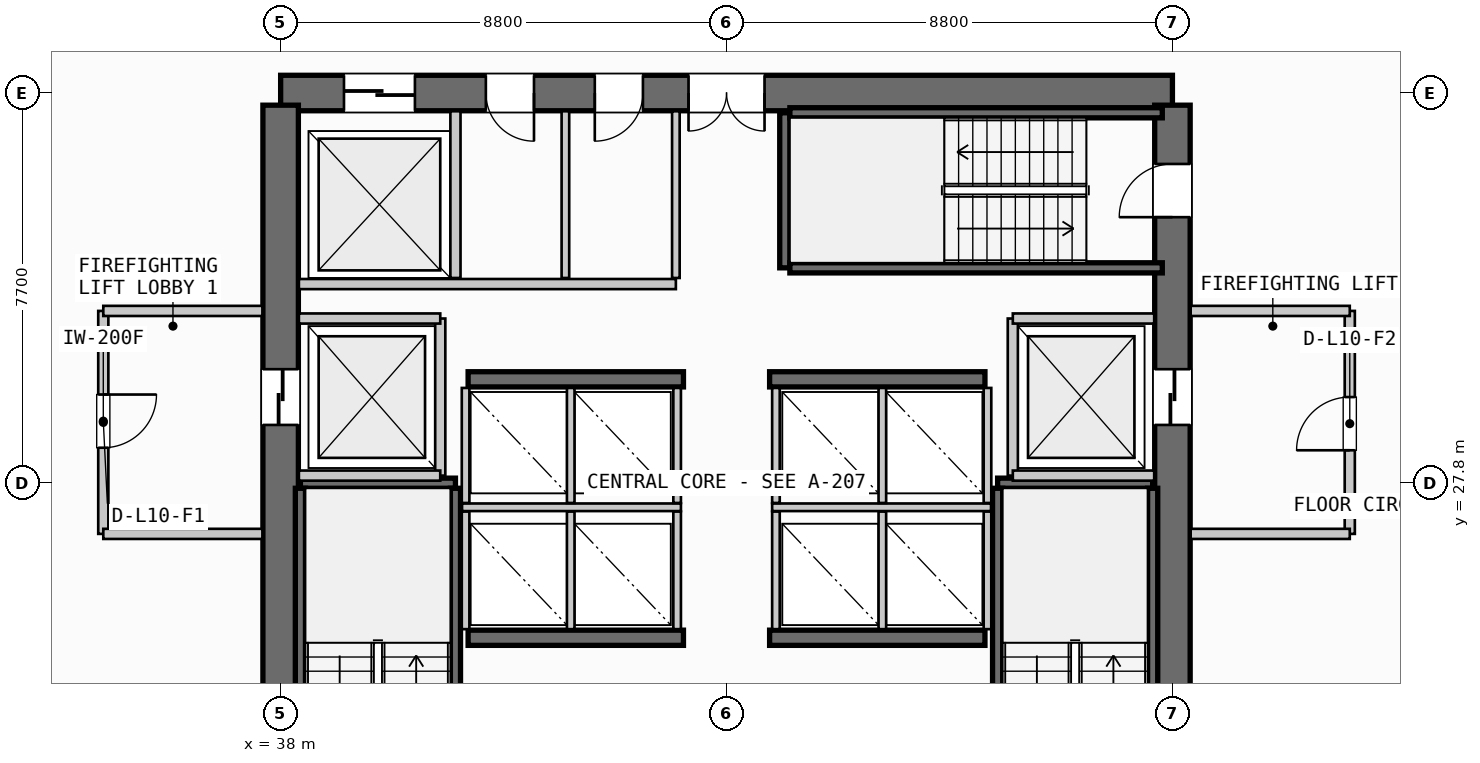
"""IFC4 building model, lengths in metres.
Left out: names, types, materials, properties, quantities, classifications, styles, units other than length and angle.
Written with IfcOpenShell. Run it as: python <this file> out.ifc"""

import sys

from ifc_helpers import new_model, si_unit, direction, frame, frame_2d, origin, place, context, subcontext, project, spatial, rectangle, extrude, source, transform, mapped, element, fill, save


model = new_model("IFC4")
c1 = context("Model", 3, precision=1e-05, world=origin(), true_north=direction((0.0, 1.0)))
c2 = subcontext(c1, "Body", "Model", "MODEL_VIEW")
j1 = project(units=[si_unit("LENGTHUNIT", "METRE"), si_unit("PLANEANGLEUNIT", "RADIAN")], contexts=[c1])
p1 = place(None, origin())
s1 = spatial("IfcSite", under=j1, at=p1, CompositionType="ELEMENT")
p2 = place(p1, origin())
s2 = spatial("IfcBuilding", under=s1, at=p2, CompositionType="ELEMENT")
p3 = place(p2, frame((0.0, 0.0, 44.8)))
s3 = spatial("IfcBuildingStorey", under=s2, at=p3, CompositionType="ELEMENT", Elevation=44.8)
p4 = place(p3, frame((55.6, 35.5, 0.0), z_axis=(0.0, 0.0, 1.0), x_axis=(-1.0, 0.0, 0.0)))
e1 = element("IfcWall", 1, at=p4, inside=s3, PredefinedType="SHEAR", context=c2, shape_type="SweptSolid", body=[
    extrude(rectangle(XDim=17.6, YDim=0.7, at=frame_2d((8.8, 0.0))), origin(), (0.0, 0.0, 1.0), 3.55),
])
p5 = place(p4, frame((8.05, 0.0, 0.0)))
e2 = element("IfcOpeningElement", 2, at=p5, cuts=e1, PredefinedType="OPENING", context=c2, shape_type="SweptSolid", body=[
    extrude(rectangle(XDim=1.5, YDim=2.2, at=frame_2d((0.75, 1.1))), frame((0.0, 0.36, 0.0), z_axis=(0.0, -1.0, 0.0), x_axis=(1.0, 0.0, 0.0)), (0.0, 0.0, 1.0), 0.72),
])
p6 = place(p4, frame((14.95, 0.0, 0.0)))
e3 = element("IfcOpeningElement", 3, at=p6, cuts=e1, PredefinedType="OPENING", context=c2, shape_type="SweptSolid", body=[
    extrude(rectangle(XDim=1.4, YDim=2.3, at=frame_2d((0.7, 1.15))), frame((0.0, 0.36, 0.0), z_axis=(0.0, -1.0, 0.0), x_axis=(1.0, 0.0, 0.0)), (0.0, 0.0, 1.0), 0.72),
])
p7 = place(p4, frame((12.6, 0.0, 0.0)))
e4 = element("IfcOpeningElement", 4, at=p7, cuts=e1, PredefinedType="OPENING", context=c2, shape_type="SweptSolid", body=[
    extrude(rectangle(XDim=0.95, YDim=2.15, at=frame_2d((0.475, 1.075))), frame((0.0, 0.36, 0.0), z_axis=(0.0, -1.0, 0.0), x_axis=(1.0, 0.0, 0.0)), (0.0, 0.0, 1.0), 0.72),
])
p8 = place(p4, frame((10.45, 0.0, 0.0)))
e5 = element("IfcOpeningElement", 5, at=p8, cuts=e1, PredefinedType="OPENING", context=c2, shape_type="SweptSolid", body=[
    extrude(rectangle(XDim=0.95, YDim=2.15, at=frame_2d((0.475, 1.075))), frame((0.0, 0.36, 0.0), z_axis=(0.0, -1.0, 0.0), x_axis=(1.0, 0.0, 0.0)), (0.0, 0.0, 1.0), 0.72),
])
p9 = place(p3, frame((38.0, 35.26, 0.0), z_axis=(0.0, 0.0, 1.0), x_axis=(0.0, -1.0, 0.0)))
e6 = element("IfcWall", 6, at=p9, inside=s3, PredefinedType="SHEAR", context=c2, shape_type="SweptSolid", body=[
    extrude(rectangle(XDim=14.92, YDim=0.7, at=frame_2d((7.46, 0.0))), origin(), (0.0, 0.0, 1.0), 3.55),
])
p10 = place(p9, frame((5.21, 0.0, 0.0)))
e7 = element("IfcOpeningElement", 7, at=p10, cuts=e6, PredefinedType="OPENING", context=c2, shape_type="SweptSolid", body=[
    extrude(rectangle(XDim=1.1, YDim=2.2, at=frame_2d((0.55, 1.1))), frame((0.0, 0.36, 0.0), z_axis=(0.0, -1.0, 0.0), x_axis=(1.0, 0.0, 0.0)), (0.0, 0.0, 1.0), 0.72),
])
p11 = place(p3, frame((55.6, 20.34, 0.0), z_axis=(0.0, 0.0, 1.0), x_axis=(0.0, 1.0, 0.0)))
e8 = element("IfcWall", 8, at=p11, inside=s3, PredefinedType="SHEAR", context=c2, shape_type="SweptSolid", body=[
    extrude(rectangle(XDim=14.92, YDim=0.7, at=frame_2d((7.46, 0.0))), origin(), (0.0, 0.0, 1.0), 3.55),
])
p12 = place(p11, frame((12.71, 0.0, 0.0)))
e9 = element("IfcOpeningElement", 9, at=p12, cuts=e8, PredefinedType="OPENING", context=c2, shape_type="SweptSolid", body=[
    extrude(rectangle(XDim=1.05, YDim=2.15, at=frame_2d((0.525, 1.075))), frame((0.0, 0.36, 0.0), z_axis=(0.0, -1.0, 0.0), x_axis=(1.0, 0.0, 0.0)), (0.0, 0.0, 1.0), 0.72),
])
p13 = place(p11, frame((8.61, 0.0, 0.0)))
e10 = element("IfcOpeningElement", 10, at=p13, cuts=e8, PredefinedType="OPENING", context=c2, shape_type="SweptSolid", body=[
    extrude(rectangle(XDim=1.1, YDim=2.2, at=frame_2d((0.55, 1.1))), frame((0.0, 0.36, 0.0), z_axis=(0.0, -1.0, 0.0), x_axis=(1.0, 0.0, 0.0)), (0.0, 0.0, 1.0), 0.72),
])
for number, where, z_axis, x_axis in (
    (11, (41.7, 24.75, 0.0), (0.0, 0.0, 1.0), (1.0, 0.0, 0.0)),
    (12, (47.65, 24.75, 0.0), (0.0, 0.0, 1.0), (1.0, 0.0, 0.0)),
    (13, (41.7, 29.85, 0.0), (0.0, 0.0, 1.0), (1.0, 0.0, 0.0)),
    (14, (47.65, 29.85, 0.0), (0.0, 0.0, 1.0), (1.0, 0.0, 0.0)),
):
    element("IfcWall", number, at=place(p3, frame(where, z_axis=z_axis, x_axis=x_axis)), inside=s3, PredefinedType="SHEAR", context=c2, shape_type="SweptSolid", body=[
        extrude(rectangle(XDim=4.25, YDim=0.3, at=frame_2d((2.125, 0.0))), origin(), (0.0, 0.0, 1.0), 3.55),
    ])
p14 = place(p3, frame((38.39, 27.8, 0.0), z_axis=(0.0, 0.0, 1.0), x_axis=(1.0, 0.0, 0.0)))
e15 = element("IfcWall", 15, at=p14, inside=s3, PredefinedType="SHEAR", context=c2, shape_type="SweptSolid", body=[
    extrude(rectangle(XDim=3.06, YDim=0.2, at=frame_2d((1.53, 0.0))), origin(), (0.0, 0.0, 1.0), 3.55),
])
for number, where, z_axis, x_axis in (
    (16, (41.45, 27.7, 0.0), (0.0, 0.0, 1.0), (0.0, -1.0, 0.0)),
    (17, (38.39, 20.35, 0.0), (0.0, 0.0, 1.0), (0.0, 1.0, 0.0)),
):
    element("IfcWall", number, at=place(p3, frame(where, z_axis=z_axis, x_axis=x_axis)), inside=s3, PredefinedType="SHEAR", context=c2, shape_type="SweptSolid", body=[
        extrude(rectangle(XDim=7.35, YDim=0.2, at=frame_2d((3.675, 0.0))), origin(), (0.0, 0.0, 1.0), 3.55),
    ])
p15 = place(p3, frame((52.15, 27.8, 0.0), z_axis=(0.0, 0.0, 1.0), x_axis=(1.0, 0.0, 0.0)))
e18 = element("IfcWall", 18, at=p15, inside=s3, PredefinedType="SHEAR", context=c2, shape_type="SweptSolid", body=[
    extrude(rectangle(XDim=3.06, YDim=0.2, at=frame_2d((1.53, 0.0))), origin(), (0.0, 0.0, 1.0), 3.55),
])
for number, where, z_axis, x_axis in (
    (19, (55.21, 27.7, 0.0), (0.0, 0.0, 1.0), (0.0, -1.0, 0.0)),
    (20, (52.15, 20.35, 0.0), (0.0, 0.0, 1.0), (0.0, 1.0, 0.0)),
):
    element("IfcWall", number, at=place(p3, frame(where, z_axis=z_axis, x_axis=x_axis)), inside=s3, PredefinedType="SHEAR", context=c2, shape_type="SweptSolid", body=[
        extrude(rectangle(XDim=7.35, YDim=0.2, at=frame_2d((3.675, 0.0))), origin(), (0.0, 0.0, 1.0), 3.55),
    ])
p16 = place(p3, frame((47.95, 32.05, 0.0), z_axis=(0.0, 0.0, 1.0), x_axis=(0.0, 1.0, 0.0)))
e21 = element("IfcWall", 21, at=p16, inside=s3, PredefinedType="SHEAR", context=c2, shape_type="SweptSolid", body=[
    extrude(rectangle(XDim=3.06, YDim=0.2, at=frame_2d((1.53, 0.0))), origin(), (0.0, 0.0, 1.0), 3.55),
])
for number, where, z_axis, x_axis in (
    (22, (48.05, 35.11, 0.0), (0.0, 0.0, 1.0), (1.0, 0.0, 0.0)),
    (23, (55.4, 32.05, 0.0), (0.0, 0.0, 1.0), (-1.0, 0.0, 0.0)),
):
    element("IfcWall", number, at=place(p3, frame(where, z_axis=z_axis, x_axis=x_axis)), inside=s3, PredefinedType="SHEAR", context=c2, shape_type="SweptSolid", body=[
        extrude(rectangle(XDim=7.35, YDim=0.2, at=frame_2d((3.675, 0.0))), origin(), (0.0, 0.0, 1.0), 3.55),
    ])
p17 = place(p3, frame((41.15, 27.95, 0.0), z_axis=(0.0, 0.0, 1.0), x_axis=(0.0, 1.0, 0.0)))
e24 = element("IfcWall", 24, at=p17, inside=s3, PredefinedType="PARTITIONING", context=c2, shape_type="SweptSolid", body=[
    extrude(rectangle(XDim=3.1, YDim=0.2, at=frame_2d((1.55, 0.0))), origin(), (0.0, 0.0, 1.0), 2.785),
])
for number, where, z_axis, x_axis in (
    (25, (38.36, 27.95, 0.0), (0.0, 0.0, 1.0), (1.0, 0.0, 0.0)),
    (26, (38.36, 31.05, 0.0), (0.0, 0.0, 1.0), (1.0, 0.0, 0.0)),
):
    element("IfcWall", number, at=place(p3, frame(where, z_axis=z_axis, x_axis=x_axis)), inside=s3, PredefinedType="PARTITIONING", context=c2, shape_type="SweptSolid", body=[
        extrude(rectangle(XDim=2.79, YDim=0.2, at=frame_2d((1.395, 0.0))), origin(), (0.0, 0.0, 1.0), 2.785),
    ])
p18 = place(p3, frame((34.5, 31.2, 0.0), z_axis=(0.0, 0.0, 1.0), x_axis=(0.0, -1.0, 0.0)))
e27 = element("IfcWall", 27, at=p18, inside=s3, PredefinedType="PARTITIONING", context=c2, shape_type="SweptSolid", body=[
    extrude(rectangle(XDim=4.4, YDim=0.2, at=frame_2d((2.2, 0.0))), origin(), (0.0, 0.0, 1.0), 2.785),
])
p19 = place(p18, frame((1.65, 0.0, 0.0)))
e28 = element("IfcOpeningElement", 28, at=p19, cuts=e27, PredefinedType="OPENING", context=c2, shape_type="SweptSolid", body=[
    extrude(rectangle(XDim=1.05, YDim=2.15, at=frame_2d((0.525, 1.075))), frame((0.0, 0.11, 0.0), z_axis=(0.0, -1.0, 0.0), x_axis=(1.0, 0.0, 0.0)), (0.0, 0.0, 1.0), 0.22),
])
for number, where, z_axis, x_axis in (
    (29, (34.5, 26.8, 0.0), (0.0, 0.0, 1.0), (1.0, 0.0, 0.0)),
    (30, (34.5, 31.2, 0.0), (0.0, 0.0, 1.0), (1.0, 0.0, 0.0)),
):
    element("IfcWall", number, at=place(p3, frame(where, z_axis=z_axis, x_axis=x_axis)), inside=s3, PredefinedType="PARTITIONING", context=c2, shape_type="SweptSolid", body=[
        extrude(rectangle(XDim=3.14, YDim=0.2, at=frame_2d((1.57, 0.0))), origin(), (0.0, 0.0, 1.0), 2.785),
    ])
p20 = place(p3, frame((52.45, 27.95, 0.0), z_axis=(0.0, 0.0, 1.0), x_axis=(0.0, 1.0, 0.0)))
e31 = element("IfcWall", 31, at=p20, inside=s3, PredefinedType="PARTITIONING", context=c2, shape_type="SweptSolid", body=[
    extrude(rectangle(XDim=3.1, YDim=0.2, at=frame_2d((1.55, 0.0))), origin(), (0.0, 0.0, 1.0), 2.785),
])
for number, where, z_axis, x_axis in (
    (32, (52.45, 27.95, 0.0), (0.0, 0.0, 1.0), (1.0, 0.0, 0.0)),
    (33, (52.45, 31.05, 0.0), (0.0, 0.0, 1.0), (1.0, 0.0, 0.0)),
):
    element("IfcWall", number, at=place(p3, frame(where, z_axis=z_axis, x_axis=x_axis)), inside=s3, PredefinedType="PARTITIONING", context=c2, shape_type="SweptSolid", body=[
        extrude(rectangle(XDim=2.79, YDim=0.2, at=frame_2d((1.395, 0.0))), origin(), (0.0, 0.0, 1.0), 2.785),
    ])
p21 = place(p3, frame((59.1, 26.8, 0.0), z_axis=(0.0, 0.0, 1.0), x_axis=(0.0, 1.0, 0.0)))
e34 = element("IfcWall", 34, at=p21, inside=s3, PredefinedType="PARTITIONING", context=c2, shape_type="SweptSolid", body=[
    extrude(rectangle(XDim=4.4, YDim=0.2, at=frame_2d((2.2, 0.0))), origin(), (0.0, 0.0, 1.0), 2.785),
])
p22 = place(p21, frame((1.65, 0.0, 0.0)))
e35 = element("IfcOpeningElement", 35, at=p22, cuts=e34, PredefinedType="OPENING", context=c2, shape_type="SweptSolid", body=[
    extrude(rectangle(XDim=1.05, YDim=2.15, at=frame_2d((0.525, 1.075))), frame((0.0, 0.11, 0.0), z_axis=(0.0, -1.0, 0.0), x_axis=(1.0, 0.0, 0.0)), (0.0, 0.0, 1.0), 0.22),
])
for number, where, z_axis, x_axis in (
    (36, (55.96, 26.8, 0.0), (0.0, 0.0, 1.0), (1.0, 0.0, 0.0)),
    (37, (55.96, 31.2, 0.0), (0.0, 0.0, 1.0), (1.0, 0.0, 0.0)),
):
    element("IfcWall", number, at=place(p3, frame(where, z_axis=z_axis, x_axis=x_axis)), inside=s3, PredefinedType="PARTITIONING", context=c2, shape_type="SweptSolid", body=[
        extrude(rectangle(XDim=3.14, YDim=0.2, at=frame_2d((1.57, 0.0))), origin(), (0.0, 0.0, 1.0), 2.785),
    ])
p23 = place(p3, frame((41.58, 27.325, 0.0), z_axis=(0.0, 0.0, 1.0), x_axis=(1.0, 0.0, 0.0)))
e38 = element("IfcWall", 38, at=p23, inside=s3, PredefinedType="PARTITIONING", context=c2, shape_type="SweptSolid", body=[
    extrude(rectangle(XDim=4.32, YDim=0.15, at=frame_2d((2.16, 0.0))), origin(), (0.0, 0.0, 1.0), 2.785),
])
p24 = place(p3, frame((47.7, 27.325, 0.0), z_axis=(0.0, 0.0, 1.0), x_axis=(1.0, 0.0, 0.0)))
e39 = element("IfcWall", 39, at=p24, inside=s3, PredefinedType="PARTITIONING", context=c2, shape_type="SweptSolid", body=[
    extrude(rectangle(XDim=4.32, YDim=0.15, at=frame_2d((2.16, 0.0))), origin(), (0.0, 0.0, 1.0), 2.785),
])
for number, where, z_axis, x_axis in (
    (40, (41.65, 24.92, 0.0), (0.0, 0.0, 1.0), (0.0, 1.0, 0.0)),
    (41, (43.725, 24.92, 0.0), (0.0, 0.0, 1.0), (0.0, 1.0, 0.0)),
    (42, (45.825, 24.92, 0.0), (0.0, 0.0, 1.0), (0.0, 1.0, 0.0)),
    (43, (47.775, 24.92, 0.0), (0.0, 0.0, 1.0), (0.0, 1.0, 0.0)),
    (44, (49.875, 24.92, 0.0), (0.0, 0.0, 1.0), (0.0, 1.0, 0.0)),
    (45, (51.95, 24.92, 0.0), (0.0, 0.0, 1.0), (0.0, 1.0, 0.0)),
):
    element("IfcWall", number, at=place(p3, frame(where, z_axis=z_axis, x_axis=x_axis)), inside=s3, PredefinedType="PARTITIONING", context=c2, shape_type="SweptSolid", body=[
        extrude(rectangle(XDim=2.32, YDim=0.15, at=frame_2d((1.16, 0.0))), origin(), (0.0, 0.0, 1.0), 2.785),
    ])
for number, where, z_axis, x_axis in (
    (46, (41.65, 27.41, 0.0), (0.0, 0.0, 1.0), (0.0, 1.0, 0.0)),
    (47, (43.725, 27.41, 0.0), (0.0, 0.0, 1.0), (0.0, 1.0, 0.0)),
    (48, (45.825, 27.41, 0.0), (0.0, 0.0, 1.0), (0.0, 1.0, 0.0)),
    (49, (47.775, 27.41, 0.0), (0.0, 0.0, 1.0), (0.0, 1.0, 0.0)),
    (50, (49.875, 27.41, 0.0), (0.0, 0.0, 1.0), (0.0, 1.0, 0.0)),
    (51, (51.95, 27.41, 0.0), (0.0, 0.0, 1.0), (0.0, 1.0, 0.0)),
):
    element("IfcWall", number, at=place(p3, frame(where, z_axis=z_axis, x_axis=x_axis)), inside=s3, PredefinedType="PARTITIONING", context=c2, shape_type="SweptSolid", body=[
        extrude(rectangle(XDim=2.27, YDim=0.15, at=frame_2d((1.135, 0.0))), origin(), (0.0, 0.0, 1.0), 2.785),
    ])
p25 = place(p3, frame((41.45, 31.85, 0.0), z_axis=(0.0, 0.0, 1.0), x_axis=(0.0, 1.0, 0.0)))
e52 = element("IfcWall", 52, at=p25, inside=s3, PredefinedType="PARTITIONING", context=c2, shape_type="SweptSolid", body=[
    extrude(rectangle(XDim=3.29, YDim=0.2, at=frame_2d((1.645, 0.0))), origin(), (0.0, 0.0, 1.0), 2.785),
])
p26 = place(p3, frame((38.36, 31.73, 0.0), z_axis=(0.0, 0.0, 1.0), x_axis=(1.0, 0.0, 0.0)))
e53 = element("IfcWall", 53, at=p26, inside=s3, PredefinedType="PARTITIONING", context=c2, shape_type="SweptSolid", body=[
    extrude(rectangle(XDim=7.44, YDim=0.2, at=frame_2d((3.72, 0.0))), origin(), (0.0, 0.0, 1.0), 2.785),
])
p27 = place(p3, frame((45.8, 31.85, 0.0), z_axis=(0.0, 0.0, 1.0), x_axis=(0.0, 1.0, 0.0)))
e54 = element("IfcWall", 54, at=p27, inside=s3, PredefinedType="PARTITIONING", context=c2, shape_type="SweptSolid", body=[
    extrude(rectangle(XDim=3.29, YDim=0.15, at=frame_2d((1.645, 0.0))), origin(), (0.0, 0.0, 1.0), 2.785),
])
p28 = place(p3, frame((43.62, 31.85, 0.0), z_axis=(0.0, 0.0, 1.0), x_axis=(0.0, 1.0, 0.0)))
e55 = element("IfcWall", 55, at=p28, inside=s3, PredefinedType="PLUMBINGWALL", context=c2, shape_type="SweptSolid", body=[
    extrude(rectangle(XDim=3.29, YDim=0.15, at=frame_2d((1.645, 0.0))), origin(), (0.0, 0.0, 1.0), 2.785),
])
m1 = source(origin(), c2, "Body", "SweptSolid", [
    extrude(rectangle(XDim=1.05, YDim=2.15, at=frame_2d((0.525, 1.075))), frame((0.0, 0.025, 0.0), z_axis=(0.0, -1.0, 0.0), x_axis=(1.0, 0.0, 0.0)), (0.0, 0.0, 1.0), 0.05),
])
p29 = place(p12, origin())
e56 = element("IfcDoor", 56, at=p29, inside=s3, OperationType="SINGLE_SWING_LEFT", PredefinedType="DOOR", context=c2, shape_type="MappedRepresentation", body=[
    mapped(m1, transform((0.0, 0.0, 0.0), scale=1.0)),
])
fill(e9, e56)
m2 = source(origin(), c2, "Body", "SweptSolid", [
    extrude(rectangle(XDim=1.5, YDim=2.2, at=frame_2d((0.75, 1.1))), frame((0.0, 0.025, 0.0), z_axis=(0.0, -1.0, 0.0), x_axis=(1.0, 0.0, 0.0)), (0.0, 0.0, 1.0), 0.05),
])
p30 = place(p5, origin())
e57 = element("IfcDoor", 57, at=p30, inside=s3, OperationType="DOUBLE_DOOR_SINGLE_SWING", PredefinedType="DOOR", context=c2, shape_type="MappedRepresentation", body=[
    mapped(m2, transform((0.0, 0.0, 0.0), scale=1.0)),
])
fill(e2, e57)
m3 = source(origin(), c2, "Body", "SweptSolid", [
    extrude(rectangle(XDim=1.1, YDim=2.2, at=frame_2d((0.55, 1.1))), frame((0.0, 0.025, 0.0), z_axis=(0.0, -1.0, 0.0), x_axis=(1.0, 0.0, 0.0)), (0.0, 0.0, 1.0), 0.05),
])
p31 = place(p10, origin())
e58 = element("IfcDoor", 58, at=p31, inside=s3, OperationType="SLIDING_TO_LEFT", PredefinedType="DOOR", context=c2, shape_type="MappedRepresentation", body=[
    mapped(m3, transform((0.0, 0.0, 0.0), scale=1.0)),
])
fill(e7, e58)
p32 = place(p13, origin())
e59 = element("IfcDoor", 59, at=p32, inside=s3, OperationType="SLIDING_TO_RIGHT", PredefinedType="DOOR", context=c2, shape_type="MappedRepresentation", body=[
    mapped(m3, transform((0.0, 0.0, 0.0), scale=1.0)),
])
fill(e10, e59)
m4 = source(origin(), c2, "Body", "SweptSolid", [
    extrude(rectangle(XDim=1.4, YDim=2.3, at=frame_2d((0.7, 1.15))), frame((0.0, 0.025, 0.0), z_axis=(0.0, -1.0, 0.0), x_axis=(1.0, 0.0, 0.0)), (0.0, 0.0, 1.0), 0.05),
])
p33 = place(p6, origin())
e60 = element("IfcDoor", 60, at=p33, inside=s3, OperationType="SLIDING_TO_RIGHT", PredefinedType="DOOR", context=c2, shape_type="MappedRepresentation", body=[
    mapped(m4, transform((0.0, 0.0, 0.0), scale=1.0)),
])
fill(e3, e60)
m5 = source(origin(), c2, "Body", "SweptSolid", [
    extrude(rectangle(XDim=0.95, YDim=2.15, at=frame_2d((0.475, 1.075))), frame((0.0, 0.025, 0.0), z_axis=(0.0, -1.0, 0.0), x_axis=(1.0, 0.0, 0.0)), (0.0, 0.0, 1.0), 0.05),
])
p34 = place(p7, origin())
e61 = element("IfcDoor", 61, at=p34, inside=s3, OperationType="SINGLE_SWING_LEFT", PredefinedType="DOOR", context=c2, shape_type="MappedRepresentation", body=[
    mapped(m5, transform((0.0, 0.0, 0.0), scale=1.0)),
])
fill(e4, e61)
p35 = place(p8, origin())
e62 = element("IfcDoor", 62, at=p35, inside=s3, OperationType="SINGLE_SWING_RIGHT", PredefinedType="DOOR", context=c2, shape_type="MappedRepresentation", body=[
    mapped(m5, transform((0.0, 0.0, 0.0), scale=1.0)),
])
fill(e5, e62)
p36 = place(p19, origin())
e63 = element("IfcDoor", 63, at=p36, inside=s3, OperationType="SINGLE_SWING_LEFT", PredefinedType="DOOR", context=c2, shape_type="MappedRepresentation", body=[
    mapped(m1, transform((0.0, 0.0, 0.0), scale=1.0)),
])
fill(e28, e63)
p37 = place(p22, origin())
e64 = element("IfcDoor", 64, at=p37, inside=s3, OperationType="SINGLE_SWING_LEFT", PredefinedType="DOOR", context=c2, shape_type="MappedRepresentation", body=[
    mapped(m1, transform((0.0, 0.0, 0.0), scale=1.0)),
])
fill(e35, e64)
save(model, sys.argv[1])
